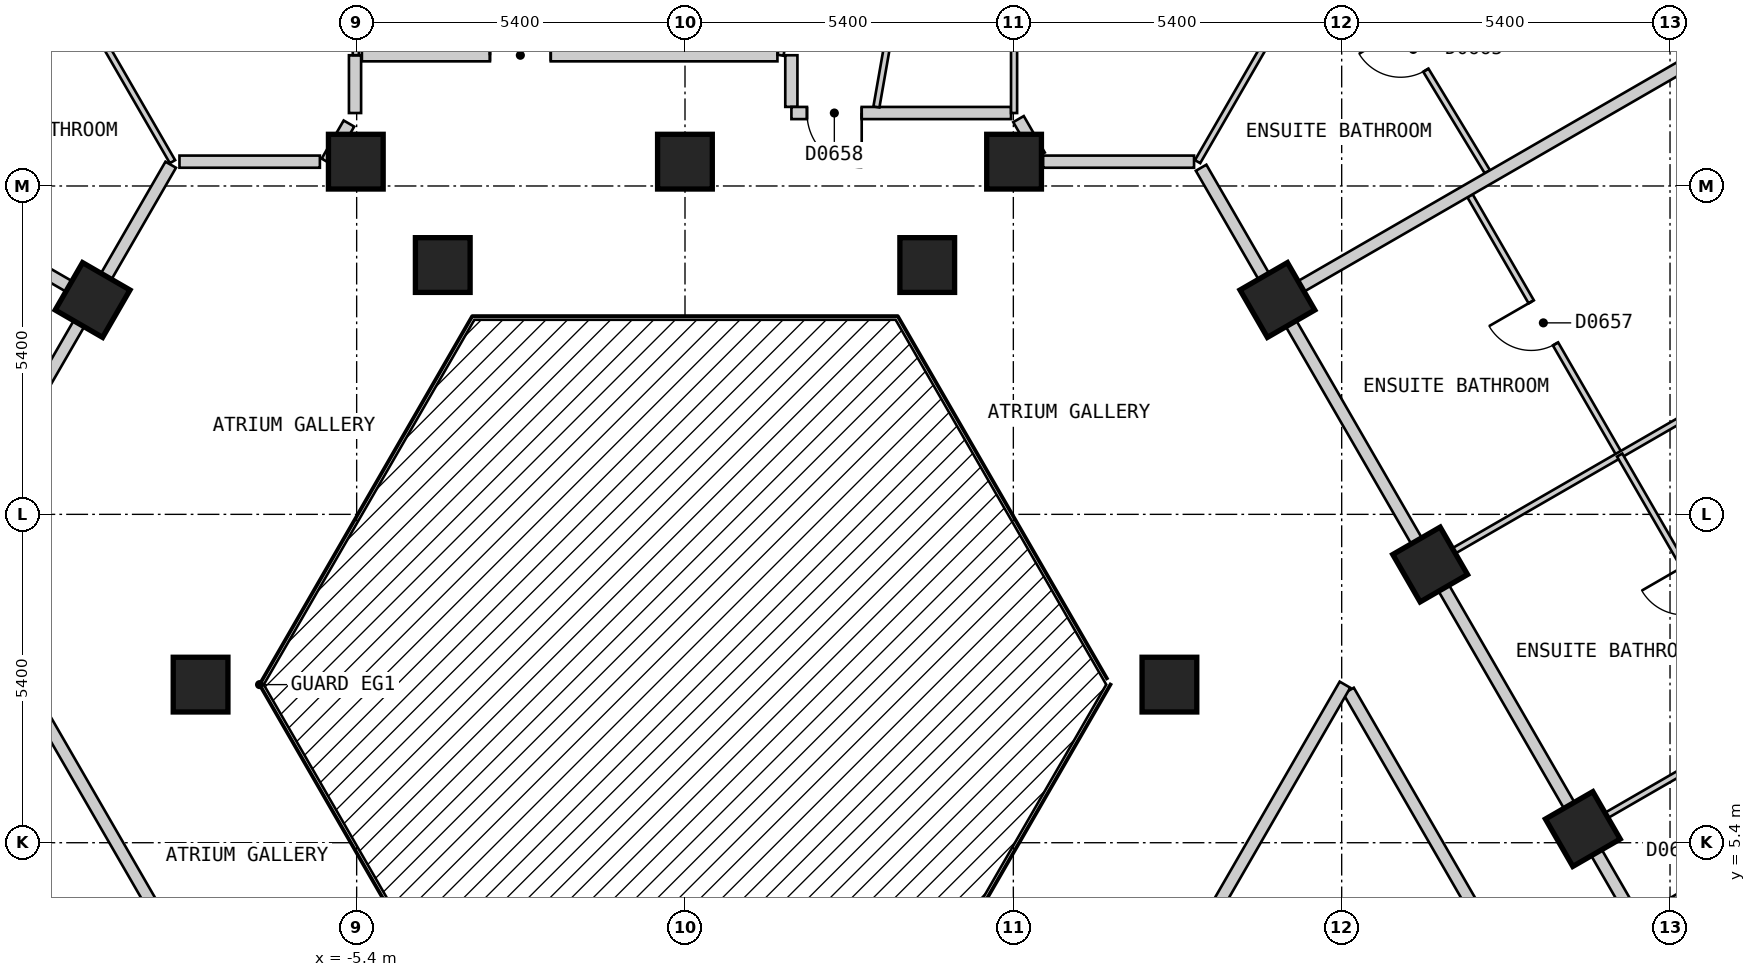
"""IFC4 building model, lengths in metres.
Left out: names, types, materials, properties, quantities, classifications, styles, units other than length and angle.
Written with IfcOpenShell. Run it as: python <this file> out.ifc"""

import sys

from ifc_helpers import new_model, si_unit, direction, frame, frame_2d, origin, origin_2d, place, context, subcontext, project, spatial, polyline, rectangle, outline, extrude, element, fill, save


model = new_model("IFC4")
c1 = context("Model", 3, precision=1e-05, world=origin(), true_north=direction((0.0, 1.0)))
c2 = subcontext(c1, "Body", "Model", "MODEL_VIEW")
j1 = project(units=[si_unit("LENGTHUNIT", "METRE"), si_unit("PLANEANGLEUNIT", "RADIAN")], contexts=[c1])
p1 = place(None, origin())
s1 = spatial("IfcSite", under=j1, at=p1, CompositionType="ELEMENT")
p2 = place(p1, origin())
s2 = spatial("IfcBuilding", under=s1, at=p2, CompositionType="ELEMENT")
p3 = place(p2, frame((0.0, 0.0, 81.0)))
s3 = spatial("IfcBuildingStorey", under=s2, at=p3, CompositionType="ELEMENT", Elevation=81.0)
for number, where, z_axis, x_axis in (
    (1, (14.766, 5.625, 0.0), (0.0, 0.0, 1.0), (-0.5, 0.866, 0.0)),
    (2, (12.255, 9.975, 0.0), (0.0, 0.0, 1.0), (-0.5, 0.866, 0.0)),
    (3, (7.967, 8.0, 0.0), (0.0, 0.0, 1.0), (1.0, 0.0, 0.0)),
    (4, (9.743, 14.325, 0.0), (0.0, 0.0, 1.0), (-0.5, 0.866, 0.0)),
    (5, (5.412, 16.6, 0.0), (0.0, 0.0, 1.0), (-1.0, 0.0, 0.0)),
    (6, (3.984, 14.9, 0.0), (0.0, 0.0, 1.0), (1.0, 0.0, 0.0)),
    (7, (-0.001, 16.6, 0.0), (0.0, 0.0, 1.0), (-1.0, 0.0, 0.0)),
    (8, (-3.984, 14.9, 0.0), (0.0, 0.0, 1.0), (1.0, 0.0, 0.0)),
    (9, (-5.414, 16.6, 0.0), (0.0, 0.0, 1.0), (-1.0, 0.0, 0.0)),
    (10, (-9.743, 14.325, 0.0), (0.0, 0.0, 1.0), (-0.5, -0.866, 0.0)),
    (11, (-7.967, 8.0, 0.0), (0.0, 0.0, 1.0), (1.0, 0.0, 0.0)),
):
    element("IfcColumn", number, at=place(p3, frame(where, z_axis=z_axis, x_axis=x_axis)), inside=s3, PredefinedType="COLUMN", context=c2, shape_type="SweptSolid", body=[
        extrude(rectangle(XDim=0.9, YDim=0.9, at=origin_2d()), origin(), (0.0, 0.0, 1.0), 3.0),
    ])
p4 = place(p3, frame((29.027, 1.425, 0.0), z_axis=(0.0, 0.0, 1.0), x_axis=(-0.500027479704, 0.866009537788, 0.0)))
e12 = element("IfcWall", 12, at=p4, inside=s3, PredefinedType="SOLIDWALL", context=c2, shape_type="SweptSolid", body=[
    extrude(outline(polyline([(0.0, -0.15), (26.559, -0.15), (26.478, 0.15), (0.08, 0.15), (0.0, -0.15)])), origin(), (0.0, 0.0, 1.0), 2.7),
])
p5 = place(p4, frame((1.227, 0.0, 0.15)))
e13 = element("IfcOpeningElement", 13, at=p5, cuts=e12, PredefinedType="OPENING", context=c2, shape_type="SweptSolid", body=[
    extrude(rectangle(XDim=1.5, YDim=2.1, at=frame_2d((0.75, 1.05))), frame((0.0, 0.16, 0.0), z_axis=(0.0, -1.0, 0.0), x_axis=(1.0, 0.0, 0.0)), (0.0, 0.0, 1.0), 0.32),
])
p6 = place(p4, frame((3.738, 0.0, 0.15)))
e14 = element("IfcOpeningElement", 14, at=p6, cuts=e12, PredefinedType="OPENING", context=c2, shape_type="SweptSolid", body=[
    extrude(rectangle(XDim=1.5, YDim=2.1, at=frame_2d((0.75, 1.05))), frame((0.0, 0.16, 0.0), z_axis=(0.0, -1.0, 0.0), x_axis=(1.0, 0.0, 0.0)), (0.0, 0.0, 1.0), 0.32),
])
p7 = place(p4, frame((6.25, 0.0, 0.15)))
e15 = element("IfcOpeningElement", 15, at=p7, cuts=e12, PredefinedType="OPENING", context=c2, shape_type="SweptSolid", body=[
    extrude(rectangle(XDim=1.5, YDim=2.1, at=frame_2d((0.75, 1.05))), frame((0.0, 0.16, 0.0), z_axis=(0.0, -1.0, 0.0), x_axis=(1.0, 0.0, 0.0)), (0.0, 0.0, 1.0), 0.32),
])
p8 = place(p4, frame((8.761, 0.0, 0.15)))
e16 = element("IfcOpeningElement", 16, at=p8, cuts=e12, PredefinedType="OPENING", context=c2, shape_type="SweptSolid", body=[
    extrude(rectangle(XDim=1.5, YDim=2.1, at=frame_2d((0.75, 1.05))), frame((0.0, 0.16, 0.0), z_axis=(0.0, -1.0, 0.0), x_axis=(1.0, 0.0, 0.0)), (0.0, 0.0, 1.0), 0.32),
])
p9 = place(p4, frame((11.273, 0.0, 0.15)))
e17 = element("IfcOpeningElement", 17, at=p9, cuts=e12, PredefinedType="OPENING", context=c2, shape_type="SweptSolid", body=[
    extrude(rectangle(XDim=1.5, YDim=2.1, at=frame_2d((0.75, 1.05))), frame((0.0, 0.16, 0.0), z_axis=(0.0, -1.0, 0.0), x_axis=(1.0, 0.0, 0.0)), (0.0, 0.0, 1.0), 0.32),
])
p10 = place(p4, frame((13.785, 0.0, 0.15)))
e18 = element("IfcOpeningElement", 18, at=p10, cuts=e12, PredefinedType="OPENING", context=c2, shape_type="SweptSolid", body=[
    extrude(rectangle(XDim=1.5, YDim=2.1, at=frame_2d((0.75, 1.05))), frame((0.0, 0.16, 0.0), z_axis=(0.0, -1.0, 0.0), x_axis=(1.0, 0.0, 0.0)), (0.0, 0.0, 1.0), 0.32),
])
p11 = place(p4, frame((16.296, 0.0, 0.15)))
e19 = element("IfcOpeningElement", 19, at=p11, cuts=e12, PredefinedType="OPENING", context=c2, shape_type="SweptSolid", body=[
    extrude(rectangle(XDim=1.5, YDim=2.1, at=frame_2d((0.75, 1.05))), frame((0.0, 0.16, 0.0), z_axis=(0.0, -1.0, 0.0), x_axis=(1.0, 0.0, 0.0)), (0.0, 0.0, 1.0), 0.32),
])
p12 = place(p4, frame((18.807, 0.0, 0.15)))
e20 = element("IfcOpeningElement", 20, at=p12, cuts=e12, PredefinedType="OPENING", context=c2, shape_type="SweptSolid", body=[
    extrude(rectangle(XDim=1.5, YDim=2.1, at=frame_2d((0.75, 1.05))), frame((0.0, 0.16, 0.0), z_axis=(0.0, -1.0, 0.0), x_axis=(1.0, 0.0, 0.0)), (0.0, 0.0, 1.0), 0.32),
])
p13 = place(p4, frame((21.319, 0.0, 0.15)))
e21 = element("IfcOpeningElement", 21, at=p13, cuts=e12, PredefinedType="OPENING", context=c2, shape_type="SweptSolid", body=[
    extrude(rectangle(XDim=1.5, YDim=2.1, at=frame_2d((0.75, 1.05))), frame((0.0, 0.16, 0.0), z_axis=(0.0, -1.0, 0.0), x_axis=(1.0, 0.0, 0.0)), (0.0, 0.0, 1.0), 0.32),
])
p14 = place(p4, frame((23.831, 0.0, 0.15)))
e22 = element("IfcOpeningElement", 22, at=p14, cuts=e12, PredefinedType="OPENING", context=c2, shape_type="SweptSolid", body=[
    extrude(rectangle(XDim=1.5, YDim=2.1, at=frame_2d((0.75, 1.05))), frame((0.0, 0.16, 0.0), z_axis=(0.0, -1.0, 0.0), x_axis=(1.0, 0.0, 0.0)), (0.0, 0.0, 1.0), 0.32),
])
p15 = place(p3, frame((-10.796, 7.899, 0.0), z_axis=(0.0, 0.0, 1.0), x_axis=(0.500010383074, -0.866019409031, 0.0)))
e23 = element("IfcWall", 23, at=p15, inside=s3, PredefinedType="PARTITIONING", context=c2, shape_type="SweptSolid", body=[
    extrude(rectangle(XDim=7.535, YDim=0.2, at=frame_2d((3.768, 0.0))), origin(), (0.0, 0.0, 1.0), 2.7),
])
p16 = place(p3, frame((5.485, 17.3, 0.0), z_axis=(0.0, 0.0, 1.0), x_axis=(0.499437640892, -0.866349838611, 0.0)))
e24 = element("IfcWall", 24, at=p16, inside=s3, PredefinedType="PARTITIONING", context=c2, shape_type="SweptSolid", body=[
    extrude(rectangle(XDim=0.693, YDim=0.2, at=frame_2d((0.346, 0.0))), origin(), (0.0, 0.0, 1.0), 2.7),
])
p17 = place(p3, frame((10.913, 7.899, 0.0), z_axis=(0.0, 0.0, 1.0), x_axis=(0.500028940566, -0.866008694296, 0.0)))
e25 = element("IfcWall", 25, at=p17, inside=s3, PredefinedType="PARTITIONING", context=c2, shape_type="SweptSolid", body=[
    extrude(rectangle(XDim=10.159, YDim=0.2, at=frame_2d((5.08, 0.0))), origin(), (0.0, 0.0, 1.0), 2.7),
])
p18 = place(p17, frame((4.63, 0.0, 0.0)))
e26 = element("IfcOpeningElement", 26, at=p18, cuts=e25, PredefinedType="OPENING", context=c2, shape_type="SweptSolid", body=[
    extrude(rectangle(XDim=0.9, YDim=2.1, at=frame_2d((0.45, 1.05))), frame((0.0, 0.11, 0.0), z_axis=(0.0, -1.0, 0.0), x_axis=(1.0, 0.0, 0.0)), (0.0, 0.0, 1.0), 0.22),
])
p19 = place(p3, frame((8.488, 16.5, 0.0), z_axis=(0.0, 0.0, 1.0), x_axis=(0.499986836607, -0.86603300354, 0.0)))
e27 = element("IfcWall", 27, at=p19, inside=s3, PredefinedType="PARTITIONING", context=c2, shape_type="SweptSolid", body=[
    extrude(rectangle(XDim=20.09, YDim=0.2, at=frame_2d((10.045, 0.0))), origin(), (0.0, 0.0, 1.0), 2.7),
])
p20 = place(p19, frame((14.569, 0.0, 0.0)))
e28 = element("IfcOpeningElement", 28, at=p20, cuts=e27, PredefinedType="OPENING", context=c2, shape_type="SweptSolid", body=[
    extrude(rectangle(XDim=1.0, YDim=2.1, at=frame_2d((0.5, 1.05))), frame((0.0, 0.11, 0.0), z_axis=(0.0, -1.0, 0.0), x_axis=(1.0, 0.0, 0.0)), (0.0, 0.0, 1.0), 0.22),
])
p21 = place(p3, frame((1.749, 18.35, 0.0), z_axis=(0.0, 0.0, 1.0), x_axis=(0.0, -1.0, 0.0)))
e29 = element("IfcWall", 29, at=p21, inside=s3, PredefinedType="PARTITIONING", context=c2, shape_type="SweptSolid", body=[
    extrude(rectangle(XDim=0.849, YDim=0.2, at=frame_2d((0.425, 0.0))), origin(), (0.0, 0.0, 1.0), 2.7),
])
p22 = place(p3, frame((-8.314, 16.6, 0.0), z_axis=(0.0, 0.0, 1.0), x_axis=(1.0, 0.0, 0.0)))
e30 = element("IfcWall", 30, at=p22, inside=s3, PredefinedType="PARTITIONING", context=c2, shape_type="SweptSolid", body=[
    extrude(rectangle(XDim=2.309, YDim=0.2, at=frame_2d((1.155, 0.0))), origin(), (0.0, 0.0, 1.0), 2.7),
])
p23 = place(p3, frame((5.889, 16.6, 0.0), z_axis=(0.0, 0.0, 1.0), x_axis=(1.0, 0.0, 0.0)))
e31 = element("IfcWall", 31, at=p23, inside=s3, PredefinedType="PARTITIONING", context=c2, shape_type="SweptSolid", body=[
    extrude(rectangle(XDim=2.483, YDim=0.2, at=frame_2d((1.242, 0.0))), origin(), (0.0, 0.0, 1.0), 2.7),
])
p24 = place(p3, frame((1.75, 17.4, 0.0), z_axis=(0.0, 0.0, 1.0), x_axis=(1.0, 0.0, 0.0)))
e32 = element("IfcWall", 32, at=p24, inside=s3, PredefinedType="PARTITIONING", context=c2, shape_type="SweptSolid", body=[
    extrude(rectangle(XDim=3.612, YDim=0.2, at=frame_2d((1.806, 0.0))), origin(), (0.0, 0.0, 1.0), 2.7),
])
p25 = place(p24, frame((0.256, 0.0, 0.0)))
e33 = element("IfcOpeningElement", 33, at=p25, cuts=e32, PredefinedType="OPENING", context=c2, shape_type="SweptSolid", body=[
    extrude(rectangle(XDim=0.9, YDim=2.1, at=frame_2d((0.45, 1.05))), frame((0.0, 0.11, 0.0), z_axis=(0.0, -1.0, 0.0), x_axis=(1.0, 0.0, 0.0)), (0.0, 0.0, 1.0), 0.22),
])
p26 = place(p3, frame((-5.314, 18.35, 0.0), z_axis=(0.0, 0.0, 1.0), x_axis=(1.0, 0.0, 0.0)))
e34 = element("IfcWall", 34, at=p26, inside=s3, PredefinedType="PARTITIONING", context=c2, shape_type="SweptSolid", body=[
    extrude(rectangle(XDim=6.834, YDim=0.2, at=frame_2d((3.417, 0.0))), origin(), (0.0, 0.0, 1.0), 2.7),
])
p27 = place(p26, frame((2.106, 0.0, 0.0)))
e35 = element("IfcOpeningElement", 35, at=p27, cuts=e34, PredefinedType="OPENING", context=c2, shape_type="SweptSolid", body=[
    extrude(rectangle(XDim=1.0, YDim=2.1, at=frame_2d((0.5, 1.05))), frame((0.0, 0.11, 0.0), z_axis=(0.0, -1.0, 0.0), x_axis=(1.0, 0.0, 0.0)), (0.0, 0.0, 1.0), 0.22),
])
p28 = place(p3, frame((6.928, 1.2, 0.0), z_axis=(0.0, 0.0, 1.0), x_axis=(0.500055327065, 0.865993458332, 0.0)))
e36 = element("IfcWall", 36, at=p28, inside=s3, PredefinedType="PARTITIONING", context=c2, shape_type="SweptSolid", body=[
    extrude(rectangle(XDim=7.851, YDim=0.2, at=frame_2d((3.926, 0.0))), origin(), (0.0, 0.0, 1.0), 2.7),
])
p29 = place(p3, frame((-5.889, 16.6, 0.0), z_axis=(0.0, 0.0, 1.0), x_axis=(0.499839240638, 0.866118198353, 0.0)))
e37 = element("IfcWall", 37, at=p29, inside=s3, PredefinedType="PARTITIONING", context=c2, shape_type="SweptSolid", body=[
    extrude(rectangle(XDim=0.724, YDim=0.2, at=frame_2d((0.362, 0.0))), origin(), (0.0, 0.0, 1.0), 2.7),
])
p30 = place(p3, frame((-18.562, -0.951, 0.0), z_axis=(0.0, 0.0, 1.0), x_axis=(0.499992962407, 0.866029466902, 0.0)))
e38 = element("IfcWall", 38, at=p30, inside=s3, PredefinedType="PARTITIONING", context=c2, shape_type="SweptSolid", body=[
    extrude(rectangle(XDim=20.208, YDim=0.2, at=frame_2d((10.104, 0.0))), origin(), (0.0, 0.0, 1.0), 2.7),
])
p31 = place(p30, frame((9.604, 0.0, 0.0)))
e39 = element("IfcOpeningElement", 39, at=p31, cuts=e38, PredefinedType="OPENING", context=c2, shape_type="SweptSolid", body=[
    extrude(rectangle(XDim=1.0, YDim=2.1, at=frame_2d((0.5, 1.05))), frame((0.0, 0.11, 0.0), z_axis=(0.0, -1.0, 0.0), x_axis=(1.0, 0.0, 0.0)), (0.0, 0.0, 1.0), 0.22),
])
p32 = place(p3, frame((-5.427, 17.4, 0.0), z_axis=(0.0, 0.0, 1.0), x_axis=(0.0, 1.0, 0.0)))
e40 = element("IfcWall", 40, at=p32, inside=s3, PredefinedType="PARTITIONING", context=c2, shape_type="SweptSolid", body=[
    extrude(rectangle(XDim=0.95, YDim=0.2, at=frame_2d((0.475, 0.0))), origin(), (0.0, 0.0, 1.0), 2.7),
])
p33 = place(p3, frame((10.738, 20.492, 0.0), z_axis=(0.0, 0.0, 1.0), x_axis=(0.518100976056, -0.855319459974, 0.0)))
e41 = element("IfcWall", 41, at=p33, inside=s3, PredefinedType="PARTITIONING", context=c2, shape_type="SweptSolid", body=[
    extrude(rectangle(XDim=4.744, YDim=0.1, at=frame_2d((2.372, 0.0))), origin(), (0.0, 0.0, 1.0), 2.7),
])
p34 = place(p33, frame((1.992, 0.0, 0.0)))
e42 = element("IfcOpeningElement", 42, at=p34, cuts=e41, PredefinedType="OPENING", context=c2, shape_type="SweptSolid", body=[
    extrude(rectangle(XDim=0.8, YDim=2.1, at=frame_2d((0.4, 1.05))), frame((0.0, 0.06, 0.0), z_axis=(0.0, -1.0, 0.0), x_axis=(1.0, 0.0, 0.0)), (0.0, 0.0, 1.0), 0.12),
])
p35 = place(p3, frame((-10.742, 20.606, 0.0), z_axis=(0.0, 0.0, 1.0), x_axis=(0.50003312339, -0.866006279142, 0.0)))
e43 = element("IfcWall", 43, at=p35, inside=s3, PredefinedType="PARTITIONING", context=c2, shape_type="SweptSolid", body=[
    extrude(rectangle(XDim=4.626, YDim=0.1, at=frame_2d((2.313, 0.0))), origin(), (0.0, 0.0, 1.0), 2.7),
])
p36 = place(p3, frame((12.911, 16.038, 0.0), z_axis=(0.0, 0.0, 1.0), x_axis=(0.499974319101, -0.866040230151, 0.0)))
e44 = element("IfcWall", 44, at=p36, inside=s3, PredefinedType="PARTITIONING", context=c2, shape_type="SweptSolid", body=[
    extrude(rectangle(XDim=4.923, YDim=0.1, at=frame_2d((2.461, 0.0))), origin(), (0.0, 0.0, 1.0), 2.7),
])
p37 = place(p36, frame((2.012, 0.0, 0.0)))
e45 = element("IfcOpeningElement", 45, at=p37, cuts=e44, PredefinedType="OPENING", context=c2, shape_type="SweptSolid", body=[
    extrude(rectangle(XDim=0.8, YDim=2.1, at=frame_2d((0.4, 1.05))), frame((0.0, 0.06, 0.0), z_axis=(0.0, -1.0, 0.0), x_axis=(1.0, 0.0, 0.0)), (0.0, 0.0, 1.0), 0.12),
])
p38 = place(p3, frame((8.43, 16.6, 0.0), z_axis=(0.0, 0.0, 1.0), x_axis=(0.499951460778, 0.866053426104, 0.0)))
e46 = element("IfcWall", 46, at=p38, inside=s3, PredefinedType="PARTITIONING", context=c2, shape_type="SweptSolid", body=[
    extrude(rectangle(XDim=4.553, YDim=0.1, at=frame_2d((2.276, 0.0))), origin(), (0.0, 0.0, 1.0), 2.7),
])
p39 = place(p3, frame((3.148, 17.5, 0.0), z_axis=(0.0, 0.0, 1.0), x_axis=(0.172821918451, 0.984953087463, 0.0)))
e47 = element("IfcWall", 47, at=p39, inside=s3, PredefinedType="PARTITIONING", context=c2, shape_type="SweptSolid", body=[
    extrude(rectangle(XDim=4.814, YDim=0.1, at=frame_2d((2.407, 0.0))), origin(), (0.0, 0.0, 1.0), 2.7),
])
p40 = place(p39, frame((1.932, 0.0, 0.0)))
e48 = element("IfcOpeningElement", 48, at=p40, cuts=e47, PredefinedType="OPENING", context=c2, shape_type="SweptSolid", body=[
    extrude(rectangle(XDim=0.9, YDim=2.1, at=frame_2d((0.45, 1.05))), frame((0.0, 0.06, 0.0), z_axis=(0.0, -1.0, 0.0), x_axis=(1.0, 0.0, 0.0)), (0.0, 0.0, 1.0), 0.12),
])
p41 = place(p3, frame((1.571, 18.35, 0.0), z_axis=(0.0, 0.0, 1.0), x_axis=(0.172742546726, 0.984967010895, 0.0)))
e49 = element("IfcWall", 49, at=p41, inside=s3, PredefinedType="PARTITIONING", context=c2, shape_type="SweptSolid", body=[
    extrude(rectangle(XDim=4.087, YDim=0.1, at=frame_2d((2.044, 0.0))), origin(), (0.0, 0.0, 1.0), 2.7),
])
p42 = place(p41, frame((1.644, 0.0, 0.0)))
e50 = element("IfcOpeningElement", 50, at=p42, cuts=e49, PredefinedType="OPENING", context=c2, shape_type="SweptSolid", body=[
    extrude(rectangle(XDim=0.8, YDim=2.1, at=frame_2d((0.4, 1.05))), frame((0.0, 0.06, 0.0), z_axis=(0.0, -1.0, 0.0), x_axis=(1.0, 0.0, 0.0)), (0.0, 0.0, 1.0), 0.12),
])
p43 = place(p3, frame((5.412, 17.4, 0.0), z_axis=(0.0, 0.0, 1.0), x_axis=(0.0, 1.0, 0.0)))
e51 = element("IfcWall", 51, at=p43, inside=s3, PredefinedType="PARTITIONING", context=c2, shape_type="SweptSolid", body=[
    extrude(rectangle(XDim=4.822, YDim=0.1, at=frame_2d((2.411, 0.0))), origin(), (0.0, 0.0, 1.0), 2.7),
])
p44 = place(p3, frame((-5.414, 18.35, 0.0), z_axis=(0.0, 0.0, 1.0), x_axis=(0.0, 1.0, 0.0)))
e52 = element("IfcWall", 52, at=p44, inside=s3, PredefinedType="PARTITIONING", context=c2, shape_type="SweptSolid", body=[
    extrude(rectangle(XDim=4.15, YDim=0.1, at=frame_2d((2.075, 0.0))), origin(), (0.0, 0.0, 1.0), 2.7),
])
p45 = place(p3, frame((14.853, 5.675, 0.0), z_axis=(0.0, 0.0, 1.0), x_axis=(0.866016855193, 0.500014806302, 0.0)))
e53 = element("IfcWall", 53, at=p45, inside=s3, PredefinedType="PARTITIONING", context=c2, shape_type="SweptSolid", body=[
    extrude(rectangle(XDim=10.0, YDim=0.1, at=frame_2d((5.0, 0.0))), origin(), (0.0, 0.0, 1.0), 2.7),
])
p46 = place(p45, frame((4.775, 0.0, 0.0)))
e54 = element("IfcOpeningElement", 54, at=p46, cuts=e53, PredefinedType="OPENING", context=c2, shape_type="SweptSolid", body=[
    extrude(rectangle(XDim=0.9, YDim=2.1, at=frame_2d((0.45, 1.05))), frame((0.0, 0.06, 0.0), z_axis=(0.0, -1.0, 0.0), x_axis=(1.0, 0.0, 0.0)), (0.0, 0.0, 1.0), 0.12),
])
p47 = place(p3, frame((12.342, 10.025, 0.0), z_axis=(0.0, 0.0, 1.0), x_axis=(0.865992435864, 0.500057097767, 0.0)))
e55 = element("IfcWall", 55, at=p47, inside=s3, PredefinedType="PARTITIONING", context=c2, shape_type="SweptSolid", body=[
    extrude(rectangle(XDim=9.999, YDim=0.1, at=frame_2d((5.0, 0.0))), origin(), (0.0, 0.0, 1.0), 2.7),
])
p48 = place(p47, frame((6.3, 0.0, 0.0)))
e56 = element("IfcOpeningElement", 56, at=p48, cuts=e55, PredefinedType="OPENING", context=c2, shape_type="SweptSolid", body=[
    extrude(rectangle(XDim=0.9, YDim=2.1, at=frame_2d((0.45, 1.05))), frame((0.0, 0.06, 0.0), z_axis=(0.0, -1.0, 0.0), x_axis=(1.0, 0.0, 0.0)), (0.0, 0.0, 1.0), 0.12),
])
p49 = place(p3, frame((15.732, 4.153, 0.0), z_axis=(0.0, 0.0, 1.0), x_axis=(0.859987631152, 0.510314877566, 0.0)))
e57 = element("IfcWall", 57, at=p49, inside=s3, PredefinedType="PARTITIONING", context=c2, shape_type="SweptSolid", body=[
    extrude(rectangle(XDim=2.52, YDim=0.1, at=frame_2d((1.26, 0.0))), origin(), (0.0, 0.0, 1.0), 2.7),
])
p50 = place(p49, frame((0.76, 0.0, 0.0)))
e58 = element("IfcOpeningElement", 58, at=p50, cuts=e57, PredefinedType="OPENING", context=c2, shape_type="SweptSolid", body=[
    extrude(rectangle(XDim=0.9, YDim=2.1, at=frame_2d((0.45, 1.05))), frame((0.0, 0.06, 0.0), z_axis=(0.0, -1.0, 0.0), x_axis=(1.0, 0.0, 0.0)), (0.0, 0.0, 1.0), 0.12),
])
for number, where, z_axis, x_axis in (
    (59, (-18.489, 19.375, 0.0), (0.0, 0.0, 1.0), (0.866, -0.5, 0.0)),
    (60, (9.83, 14.375, 0.0), (0.0, 0.0, 1.0), (0.866, 0.5, 0.0)),
):
    element("IfcWall", number, at=place(p3, frame(where, z_axis=z_axis, x_axis=x_axis)), inside=s3, PredefinedType="PARTITIONING", context=c2, shape_type="SweptSolid", body=[
        extrude(rectangle(XDim=10.0, YDim=0.2, at=frame_2d((5.0, 0.0))), origin(), (0.0, 0.0, 1.0), 2.7),
    ])
p51 = place(p3, frame((15.372, 11.775, 0.0), z_axis=(0.0, 0.0, 1.0), x_axis=(0.500035488351, -0.866004913606, 0.0)))
e61 = element("IfcWall", 61, at=p51, inside=s3, PredefinedType="PARTITIONING", context=c2, shape_type="SweptSolid", body=[
    extrude(rectangle(XDim=4.973, YDim=0.1, at=frame_2d((2.487, 0.0))), origin(), (0.0, 0.0, 1.0), 2.7),
])
p52 = place(p51, frame((2.112, 0.0, 0.0)))
e62 = element("IfcOpeningElement", 62, at=p52, cuts=e61, PredefinedType="OPENING", context=c2, shape_type="SweptSolid", body=[
    extrude(rectangle(XDim=0.8, YDim=2.1, at=frame_2d((0.4, 1.05))), frame((0.0, 0.06, 0.0), z_axis=(0.0, -1.0, 0.0), x_axis=(1.0, 0.0, 0.0)), (0.0, 0.0, 1.0), 0.12),
])
p53 = place(p27, origin())
e63 = element("IfcDoor", 63, at=p53, inside=s3, OperationType="SINGLE_SWING_LEFT", PredefinedType="DOOR", context=c2, shape_type="SweptSolid", body=[
    extrude(rectangle(XDim=1.0, YDim=2.1, at=frame_2d((0.5, 1.05))), frame((0.0, 0.025, 0.0), z_axis=(0.0, -1.0, 0.0), x_axis=(1.0, 0.0, 0.0)), (0.0, 0.0, 1.0), 0.05),
])
fill(e35, e63)
p54 = place(p37, origin())
e64 = element("IfcDoor", 64, at=p54, inside=s3, OperationType="SINGLE_SWING_LEFT", PredefinedType="DOOR", context=c2, shape_type="SweptSolid", body=[
    extrude(rectangle(XDim=0.8, YDim=2.1, at=frame_2d((0.4, 1.05))), frame((0.0, 0.025, 0.0), z_axis=(0.0, -1.0, 0.0), x_axis=(1.0, 0.0, 0.0)), (0.0, 0.0, 1.0), 0.05),
])
fill(e45, e64)
p55 = place(p25, origin())
e65 = element("IfcDoor", 65, at=p55, inside=s3, OperationType="SINGLE_SWING_RIGHT", PredefinedType="DOOR", context=c2, shape_type="SweptSolid", body=[
    extrude(rectangle(XDim=0.9, YDim=2.1, at=frame_2d((0.45, 1.05))), frame((0.0, 0.025, 0.0), z_axis=(0.0, -1.0, 0.0), x_axis=(1.0, 0.0, 0.0)), (0.0, 0.0, 1.0), 0.05),
])
fill(e33, e65)
p56 = place(p34, origin())
e66 = element("IfcDoor", 66, at=p56, inside=s3, OperationType="SINGLE_SWING_LEFT", PredefinedType="DOOR", context=c2, shape_type="SweptSolid", body=[
    extrude(rectangle(XDim=0.8, YDim=2.1, at=frame_2d((0.4, 1.05))), frame((0.0, 0.025, 0.0), z_axis=(0.0, -1.0, 0.0), x_axis=(1.0, 0.0, 0.0)), (0.0, 0.0, 1.0), 0.05),
])
fill(e42, e66)
save(model, sys.argv[1])
